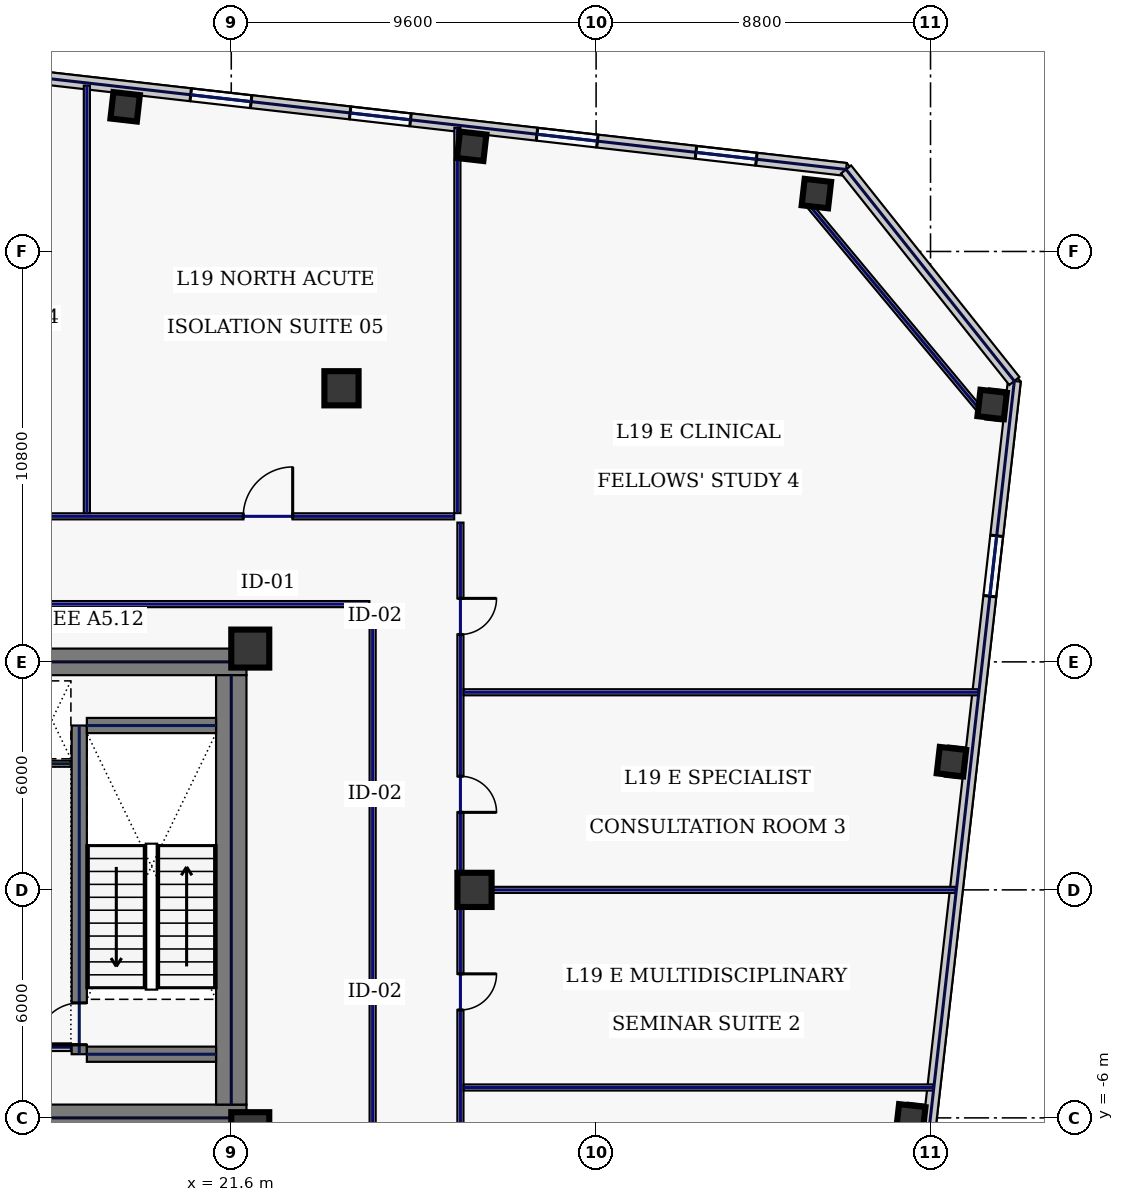
"""IFC4 building model, lengths in metres.
Left out: names, types, materials, properties, quantities, classifications, styles, units other than length and angle.
Written with IfcOpenShell. Run it as: python <this file> out.ifc"""

import sys

from ifc_helpers import new_model, si_unit, direction, frame, frame_2d, origin, origin_2d, place, context, subcontext, project, spatial, rectangle, hollow_rectangle, extrude, element, fill, save


model = new_model("IFC4")
c1 = context("Model", 3, precision=1e-05, world=origin(), true_north=direction((0.0, 1.0)))
c2 = subcontext(c1, "Body", "Model", "MODEL_VIEW")
j1 = project(units=[si_unit("LENGTHUNIT", "METRE"), si_unit("PLANEANGLEUNIT", "RADIAN")], contexts=[c1])
p1 = place(None, origin())
s1 = spatial("IfcSite", under=j1, at=p1, CompositionType="ELEMENT")
p2 = place(p1, origin())
s2 = spatial("IfcBuilding", under=s1, at=p2, CompositionType="ELEMENT")
p3 = place(p2, frame((0.0, 0.0, 89.4)))
s3 = spatial("IfcBuildingStorey", under=s2, at=p3, CompositionType="ELEMENT", Elevation=89.4)
for number, where, z_axis, x_axis in (
    (1, (10.45, 6.0, 0.0), (0.0, 0.0, 1.0), (1.0, 0.0, 0.0)),
    (2, (10.45, -6.0, 0.0), (0.0, 0.0, 1.0), (1.0, 0.0, 0.0)),
):
    element("IfcWall", number, at=place(p3, frame(where, z_axis=z_axis, x_axis=x_axis)), inside=s3, PredefinedType="SHEAR", context=c2, shape_type="SweptSolid", body=[
        extrude(rectangle(XDim=11.55, YDim=0.7, at=frame_2d((5.775, 0.0))), origin(), (0.0, 0.0, 1.0), 3.74),
    ])
p4 = place(p3, frame((21.6, -5.65, 0.0), z_axis=(0.0, 0.0, 1.0), x_axis=(0.0, 1.0, 0.0)))
e3 = element("IfcWall", 3, at=p4, inside=s3, PredefinedType="SHEAR", context=c2, shape_type="SweptSolid", body=[
    extrude(rectangle(XDim=11.3, YDim=0.8, at=frame_2d((5.65, 0.0))), origin(), (0.0, 0.0, 1.0), 3.74),
])
p5 = place(p3, frame((17.6, -4.325, 0.0), z_axis=(0.0, 0.0, 1.0), x_axis=(0.0, 1.0, 0.0)))
e4 = element("IfcWall", 4, at=p5, inside=s3, PredefinedType="SHEAR", context=c2, shape_type="SweptSolid", body=[
    extrude(rectangle(XDim=8.65, YDim=0.4, at=frame_2d((4.325, 0.0))), origin(), (0.0, 0.0, 1.0), 3.74),
])
p6 = place(p5, frame((0.25, 0.0, 0.0)))
e5 = element("IfcOpeningElement", 5, at=p6, cuts=e4, PredefinedType="OPENING", context=c2, shape_type="SweptSolid", body=[
    extrude(rectangle(XDim=1.1, YDim=2.2, at=frame_2d((0.55, 1.1))), frame((0.0, 0.21, 0.0), z_axis=(0.0, -1.0, 0.0), x_axis=(1.0, 0.0, 0.0)), (0.0, 0.0, 1.0), 0.42),
])
for number, where, z_axis, x_axis in (
    (6, (17.8, -4.325, 0.0), (0.0, 0.0, 1.0), (1.0, 0.0, 0.0)),
    (7, (17.8, 4.325, 0.0), (0.0, 0.0, 1.0), (1.0, 0.0, 0.0)),
):
    element("IfcWall", number, at=place(p3, frame(where, z_axis=z_axis, x_axis=x_axis)), inside=s3, PredefinedType="SHEAR", context=c2, shape_type="SweptSolid", body=[
        extrude(rectangle(XDim=3.4, YDim=0.4, at=frame_2d((1.7, 0.0))), origin(), (0.0, 0.0, 1.0), 3.74),
    ])
for number, where, z_axis, x_axis in (
    (8, (22.1, -6.35, 0.0), (0.0, 0.0, 1.0), (1.0, 0.0, 0.0)),
    (9, (22.1, 6.35, 0.0), (0.0, 0.0, 1.0), (1.0, 0.0, 0.0)),
):
    element("IfcColumn", number, at=place(p3, frame(where, z_axis=z_axis, x_axis=x_axis)), inside=s3, PredefinedType="COLUMN", context=c2, shape_type="SweptSolid", body=[
        extrude(hollow_rectangle(XDim=1.0, YDim=1.0, WallThickness=0.045, at=origin_2d()), origin(), (0.0, 0.0, 1.0), 3.74),
    ])
for number, where, z_axis, x_axis in (
    (10, (24.5, 13.2, 0.0), (0.0, 0.0, 1.0), (1.0, 0.0, 0.0)),
    (11, (28.0, 0.0, 0.0), (0.0, 0.0, 1.0), (1.0, 0.0, 0.0)),
):
    element("IfcColumn", number, at=place(p3, frame(where, z_axis=z_axis, x_axis=x_axis)), inside=s3, PredefinedType="COLUMN", context=c2, shape_type="SweptSolid", body=[
        extrude(hollow_rectangle(XDim=0.9, YDim=0.9, WallThickness=0.04, at=origin_2d()), origin(), (0.0, 0.0, 1.0), 3.74),
    ])
for number, where, z_axis, x_axis in (
    (12, (36.997, 18.323, 0.0), (0.0, 0.0, 1.0), (0.994, -0.113, 0.0)),
    (13, (27.926, 19.568, 0.0), (0.0, 0.0, 1.0), (0.994, -0.113, 0.0)),
    (14, (18.808, 20.607, 0.0), (0.0, 0.0, 1.0), (0.994, -0.113, 0.0)),
    (15, (39.48, -6.025, 0.0), (0.0, 0.0, 1.0), (0.994, -0.113, 0.0)),
    (16, (40.551, 3.375, 0.0), (0.0, 0.0, 1.0), (0.994, -0.113, 0.0)),
    (17, (41.622, 12.774, 0.0), (0.0, 0.0, 1.0), (0.994, -0.113, 0.0)),
):
    element("IfcColumn", number, at=place(p3, frame(where, z_axis=z_axis, x_axis=x_axis)), inside=s3, PredefinedType="COLUMN", context=c2, shape_type="SweptSolid", body=[
        extrude(hollow_rectangle(XDim=0.7, YDim=0.7, WallThickness=0.032, at=origin_2d()), origin(), (0.0, 0.0, 1.0), 3.74),
    ])
p7 = place(p3, frame((37.777, 18.958, 0.0), z_axis=(0.0, 0.0, 1.0), x_axis=(-0.993571362037, 0.113207546299, 0.0)))
e18 = element("IfcWall", 18, at=p7, inside=s3, PredefinedType="STANDARD", context=c2, shape_type="SweptSolid", body=[
    extrude(rectangle(XDim=21.223, YDim=0.34, at=frame_2d((10.611, 0.0))), origin(), (0.0, 0.0, 1.0), 3.74),
])
p8 = place(p7, frame((15.756, 0.0, 0.22)))
e19 = element("IfcOpeningElement", 19, at=p8, cuts=e18, PredefinedType="OPENING", context=c2, shape_type="SweptSolid", body=[
    extrude(rectangle(XDim=1.6, YDim=1.2, at=frame_2d((0.8, 0.6))), frame((0.0, 0.18, 0.0), z_axis=(0.0, -1.0, 0.0), x_axis=(1.0, 0.0, 0.0)), (0.0, 0.0, 1.0), 0.36),
])
p9 = place(p7, frame((11.535, 0.0, 0.22)))
e20 = element("IfcOpeningElement", 20, at=p9, cuts=e18, PredefinedType="OPENING", context=c2, shape_type="SweptSolid", body=[
    extrude(rectangle(XDim=1.6, YDim=1.2, at=frame_2d((0.8, 0.6))), frame((0.0, 0.18, 0.0), z_axis=(0.0, -1.0, 0.0), x_axis=(1.0, 0.0, 0.0)), (0.0, 0.0, 1.0), 0.36),
])
p10 = place(p7, frame((6.586, 0.0, 0.22)))
e21 = element("IfcOpeningElement", 21, at=p10, cuts=e18, PredefinedType="OPENING", context=c2, shape_type="SweptSolid", body=[
    extrude(rectangle(XDim=1.6, YDim=1.2, at=frame_2d((0.8, 0.6))), frame((0.0, 0.18, 0.0), z_axis=(0.0, -1.0, 0.0), x_axis=(1.0, 0.0, 0.0)), (0.0, 0.0, 1.0), 0.36),
])
p11 = place(p7, frame((2.375, 0.0, 0.22)))
e22 = element("IfcOpeningElement", 22, at=p11, cuts=e18, PredefinedType="OPENING", context=c2, shape_type="SweptSolid", body=[
    extrude(rectangle(XDim=1.6, YDim=1.2, at=frame_2d((0.8, 0.6))), frame((0.0, 0.18, 0.0), z_axis=(0.0, -1.0, 0.0), x_axis=(1.0, 0.0, 0.0)), (0.0, 0.0, 1.0), 0.36),
])
p12 = place(p3, frame((37.768, -25.556, 0.0), z_axis=(0.0, 0.0, 1.0), x_axis=(0.113201605824, 0.993572038877, 0.0)))
e23 = element("IfcWall", 23, at=p12, inside=s3, PredefinedType="STANDARD", context=c2, shape_type="SweptSolid", body=[
    extrude(rectangle(XDim=39.2, YDim=0.34, at=frame_2d((19.6, 0.0))), origin(), (0.0, 0.0, 1.0), 3.74),
])
p13 = place(p12, frame((4.1, 0.0, 0.22)))
e24 = element("IfcOpeningElement", 24, at=p13, cuts=e23, PredefinedType="OPENING", context=c2, shape_type="SweptSolid", body=[
    extrude(rectangle(XDim=1.6, YDim=1.2, at=frame_2d((0.8, 0.6))), frame((0.0, 0.18, 0.0), z_axis=(0.0, -1.0, 0.0), x_axis=(1.0, 0.0, 0.0)), (0.0, 0.0, 1.0), 0.36),
])
p14 = place(p12, frame((13.9, 0.0, 0.22)))
e25 = element("IfcOpeningElement", 25, at=p14, cuts=e23, PredefinedType="OPENING", context=c2, shape_type="SweptSolid", body=[
    extrude(rectangle(XDim=1.6, YDim=1.2, at=frame_2d((0.8, 0.6))), frame((0.0, 0.18, 0.0), z_axis=(0.0, -1.0, 0.0), x_axis=(1.0, 0.0, 0.0)), (0.0, 0.0, 1.0), 0.36),
])
p15 = place(p12, frame((33.5, 0.0, 0.22)))
e26 = element("IfcOpeningElement", 26, at=p15, cuts=e23, PredefinedType="OPENING", context=c2, shape_type="SweptSolid", body=[
    extrude(rectangle(XDim=1.6, YDim=1.2, at=frame_2d((0.8, 0.6))), frame((0.0, 0.18, 0.0), z_axis=(0.0, -1.0, 0.0), x_axis=(1.0, 0.0, 0.0)), (0.0, 0.0, 1.0), 0.36),
])
p16 = place(p3, frame((42.206, 13.392, 0.0), z_axis=(0.0, 0.0, 1.0), x_axis=(-0.622524521309, 0.782600294128, 0.0)))
e27 = element("IfcWall", 27, at=p16, inside=s3, PredefinedType="STANDARD", context=c2, shape_type="SweptSolid", body=[
    extrude(rectangle(XDim=7.113, YDim=0.34, at=frame_2d((3.557, 0.0))), origin(), (0.0, 0.0, 1.0), 3.74),
])
p17 = place(p3, frame((15.725, 3.32, 0.0), z_axis=(0.0, 0.0, 1.0), x_axis=(1.0, 0.0, 0.0)))
e28 = element("IfcWall", 28, at=p17, inside=s3, PredefinedType="PARTITIONING", context=c2, shape_type="SweptSolid", body=[
    extrude(rectangle(XDim=1.655, YDim=0.16, at=frame_2d((0.827, 0.0))), origin(), (0.0, 0.0, 1.0), 3.74),
])
p18 = place(p3, frame((14.72, -4.14, 0.0), z_axis=(0.0, 0.0, 1.0), x_axis=(1.0, 0.0, 0.0)))
e29 = element("IfcWall", 29, at=p18, inside=s3, PredefinedType="SOLIDWALL", context=c2, shape_type="SweptSolid", body=[
    extrude(rectangle(XDim=2.66, YDim=0.2, at=frame_2d((1.33, 0.0))), origin(), (0.0, 0.0, 1.0), 3.74),
])
p19 = place(p18, frame((0.88, 0.0, 0.0)))
e30 = element("IfcOpeningElement", 30, at=p19, cuts=e29, PredefinedType="OPENING", context=c2, shape_type="SweptSolid", body=[
    extrude(rectangle(XDim=0.95, YDim=2.2, at=frame_2d((0.475, 1.1))), frame((0.0, 0.11, 0.0), z_axis=(0.0, -1.0, 0.0), x_axis=(1.0, 0.0, 0.0)), (0.0, 0.0, 1.0), 0.22),
])
p20 = place(p3, frame((41.361, 12.556, 0.0), z_axis=(0.0, 0.0, 1.0), x_axis=(-0.640217638562, 0.768193579298, 0.0)))
e31 = element("IfcWall", 31, at=p20, inside=s3, PredefinedType="PARTITIONING", context=c2, shape_type="SweptSolid", body=[
    extrude(rectangle(XDim=7.224, YDim=0.16, at=frame_2d((3.612, 0.0))), origin(), (0.0, 0.0, 1.0), 1.535),
])
p21 = place(p3, frame((-27.465, 9.83, 0.0), z_axis=(0.0, 0.0, 1.0), x_axis=(1.0, 0.0, 0.0)))
e32 = element("IfcWall", 32, at=p21, inside=s3, PredefinedType="PARTITIONING", context=c2, shape_type="SweptSolid", body=[
    extrude(rectangle(XDim=54.93, YDim=0.16, at=frame_2d((27.465, 0.0))), origin(), (0.0, 0.0, 1.0), 3.74),
])
p22 = place(p21, frame((4.294, 0.0, 0.0)))
e33 = element("IfcOpeningElement", 33, at=p22, cuts=e32, PredefinedType="OPENING", context=c2, shape_type="SweptSolid", body=[
    extrude(rectangle(XDim=0.95, YDim=2.2, at=frame_2d((0.475, 1.1))), frame((0.0, 0.09, 0.0), z_axis=(0.0, -1.0, 0.0), x_axis=(1.0, 0.0, 0.0)), (0.0, 0.0, 1.0), 0.18),
])
p23 = place(p21, frame((13.84, 0.0, 0.0)))
e34 = element("IfcOpeningElement", 34, at=p23, cuts=e32, PredefinedType="OPENING", context=c2, shape_type="SweptSolid", body=[
    extrude(rectangle(XDim=1.3, YDim=2.2, at=frame_2d((0.65, 1.1))), frame((0.0, 0.09, 0.0), z_axis=(0.0, -1.0, 0.0), x_axis=(1.0, 0.0, 0.0)), (0.0, 0.0, 1.0), 0.18),
])
p24 = place(p21, frame((23.995, 0.0, 0.0)))
e35 = element("IfcOpeningElement", 35, at=p24, cuts=e32, PredefinedType="OPENING", context=c2, shape_type="SweptSolid", body=[
    extrude(rectangle(XDim=0.95, YDim=2.2, at=frame_2d((0.475, 1.1))), frame((0.0, 0.09, 0.0), z_axis=(0.0, -1.0, 0.0), x_axis=(1.0, 0.0, 0.0)), (0.0, 0.0, 1.0), 0.18),
])
p25 = place(p21, frame((32.335, 0.0, 0.0)))
e36 = element("IfcOpeningElement", 36, at=p25, cuts=e32, PredefinedType="OPENING", context=c2, shape_type="SweptSolid", body=[
    extrude(rectangle(XDim=1.05, YDim=2.2, at=frame_2d((0.525, 1.1))), frame((0.0, 0.09, 0.0), z_axis=(0.0, -1.0, 0.0), x_axis=(1.0, 0.0, 0.0)), (0.0, 0.0, 1.0), 0.18),
])
p26 = place(p21, frame((40.455, 0.0, 0.0)))
e37 = element("IfcOpeningElement", 37, at=p26, cuts=e32, PredefinedType="OPENING", context=c2, shape_type="SweptSolid", body=[
    extrude(rectangle(XDim=0.95, YDim=2.2, at=frame_2d((0.475, 1.1))), frame((0.0, 0.09, 0.0), z_axis=(0.0, -1.0, 0.0), x_axis=(1.0, 0.0, 0.0)), (0.0, 0.0, 1.0), 0.18),
])
p27 = place(p21, frame((49.381, 0.0, 0.0)))
e38 = element("IfcOpeningElement", 38, at=p27, cuts=e32, PredefinedType="OPENING", context=c2, shape_type="SweptSolid", body=[
    extrude(rectangle(XDim=1.3, YDim=2.2, at=frame_2d((0.65, 1.1))), frame((0.0, 0.09, 0.0), z_axis=(0.0, -1.0, 0.0), x_axis=(1.0, 0.0, 0.0)), (0.0, 0.0, 1.0), 0.18),
])
p28 = place(p3, frame((27.63, 9.665, 0.0), z_axis=(0.0, 0.0, 1.0), x_axis=(0.0, -1.0, 0.0)))
e39 = element("IfcWall", 39, at=p28, inside=s3, PredefinedType="PARTITIONING", context=c2, shape_type="SweptSolid", body=[
    extrude(rectangle(XDim=19.28, YDim=0.16, at=frame_2d((9.64, 0.0))), origin(), (0.0, 0.0, 1.0), 3.74),
])
p29 = place(p28, frame((16.531, 0.0, 0.0)))
e40 = element("IfcOpeningElement", 40, at=p29, cuts=e39, PredefinedType="OPENING", context=c2, shape_type="SweptSolid", body=[
    extrude(rectangle(XDim=0.95, YDim=2.2, at=frame_2d((0.475, 1.1))), frame((0.0, 0.09, 0.0), z_axis=(0.0, -1.0, 0.0), x_axis=(1.0, 0.0, 0.0)), (0.0, 0.0, 1.0), 0.18),
])
p30 = place(p28, frame((11.875, 0.0, 0.0)))
e41 = element("IfcOpeningElement", 41, at=p30, cuts=e39, PredefinedType="OPENING", context=c2, shape_type="SweptSolid", body=[
    extrude(rectangle(XDim=0.95, YDim=2.2, at=frame_2d((0.475, 1.1))), frame((0.0, 0.09, 0.0), z_axis=(0.0, -1.0, 0.0), x_axis=(1.0, 0.0, 0.0)), (0.0, 0.0, 1.0), 0.18),
])
p31 = place(p28, frame((6.675, 0.0, 0.0)))
e42 = element("IfcOpeningElement", 42, at=p31, cuts=e39, PredefinedType="OPENING", context=c2, shape_type="SweptSolid", body=[
    extrude(rectangle(XDim=0.95, YDim=2.2, at=frame_2d((0.475, 1.1))), frame((0.0, 0.09, 0.0), z_axis=(0.0, -1.0, 0.0), x_axis=(1.0, 0.0, 0.0)), (0.0, 0.0, 1.0), 0.18),
])
p32 = place(p28, frame((1.994, 0.0, 0.0)))
e43 = element("IfcOpeningElement", 43, at=p32, cuts=e39, PredefinedType="OPENING", context=c2, shape_type="SweptSolid", body=[
    extrude(rectangle(XDim=0.95, YDim=2.2, at=frame_2d((0.475, 1.1))), frame((0.0, 0.09, 0.0), z_axis=(0.0, -1.0, 0.0), x_axis=(1.0, 0.0, 0.0)), (0.0, 0.0, 1.0), 0.18),
])
p33 = place(p3, frame((25.235, 7.52, 0.0), z_axis=(0.0, 0.0, 1.0), x_axis=(-1.0, 0.0, 0.0)))
e44 = element("IfcWall", 44, at=p33, inside=s3, PredefinedType="PARTITIONING", context=c2, shape_type="SweptSolid", body=[
    extrude(rectangle(XDim=14.57, YDim=0.16, at=frame_2d((7.285, 0.0))), origin(), (0.0, 0.0, 1.0), 3.74),
])
p34 = place(p3, frame((25.32, -7.385, 0.0), z_axis=(0.0, 0.0, 1.0), x_axis=(0.0, 1.0, 0.0)))
e45 = element("IfcWall", 45, at=p34, inside=s3, PredefinedType="PARTITIONING", context=c2, shape_type="SweptSolid", body=[
    extrude(rectangle(XDim=14.82, YDim=0.16, at=frame_2d((7.41, 0.0))), origin(), (0.0, 0.0, 1.0), 3.74),
])
p35 = place(p3, frame((27.55, 9.915, 0.0), z_axis=(0.0, 0.0, 1.0), x_axis=(0.0, 1.0, 0.0)))
e46 = element("IfcWall", 46, at=p35, inside=s3, PredefinedType="PARTITIONING", context=c2, shape_type="SweptSolid", body=[
    extrude(rectangle(XDim=10.138, YDim=0.16, at=frame_2d((5.069, 0.0))), origin(), (0.0, 0.0, 1.0), 3.74),
])
p36 = place(p3, frame((17.8, 9.915, 0.0), z_axis=(0.0, 0.0, 1.0), x_axis=(0.0, 1.0, 0.0)))
e47 = element("IfcWall", 47, at=p36, inside=s3, PredefinedType="PARTITIONING", context=c2, shape_type="SweptSolid", body=[
    extrude(rectangle(XDim=11.249, YDim=0.16, at=frame_2d((5.625, 0.0))), origin(), (0.0, 0.0, 1.0), 3.74),
])
p37 = place(p3, frame((27.715, -5.2, 0.0), z_axis=(0.0, 0.0, 1.0), x_axis=(1.0, 0.0, 0.0)))
e48 = element("IfcWall", 48, at=p37, inside=s3, PredefinedType="PARTITIONING", context=c2, shape_type="SweptSolid", body=[
    extrude(rectangle(XDim=12.352, YDim=0.16, at=frame_2d((6.176, 0.0))), origin(), (0.0, 0.0, 1.0), 3.74),
])
p38 = place(p3, frame((27.715, 0.0, 0.0), z_axis=(0.0, 0.0, 1.0), x_axis=(1.0, 0.0, 0.0)))
e49 = element("IfcWall", 49, at=p38, inside=s3, PredefinedType="PARTITIONING", context=c2, shape_type="SweptSolid", body=[
    extrude(rectangle(XDim=12.945, YDim=0.16, at=frame_2d((6.472, 0.0))), origin(), (0.0, 0.0, 1.0), 2.135),
])
p39 = place(p3, frame((27.715, 5.2, 0.0), z_axis=(0.0, 0.0, 1.0), x_axis=(1.0, 0.0, 0.0)))
e50 = element("IfcWall", 50, at=p39, inside=s3, PredefinedType="PARTITIONING", context=c2, shape_type="SweptSolid", body=[
    extrude(rectangle(XDim=13.537, YDim=0.16, at=frame_2d((6.769, 0.0))), origin(), (0.0, 0.0, 1.0), 3.74),
])
p40 = place(p8, origin())
e51 = element("IfcWindow", 51, at=p40, inside=s3, PartitioningType="SINGLE_PANEL", PredefinedType="WINDOW", context=c2, shape_type="SweptSolid", body=[
    extrude(rectangle(XDim=1.6, YDim=1.2, at=frame_2d((0.8, 0.6))), frame((0.0, 0.03, 0.0), z_axis=(0.0, -1.0, 0.0), x_axis=(1.0, 0.0, 0.0)), (0.0, 0.0, 1.0), 0.06),
])
fill(e19, e51)
p41 = place(p9, origin())
e52 = element("IfcWindow", 52, at=p41, inside=s3, PartitioningType="SINGLE_PANEL", PredefinedType="WINDOW", context=c2, shape_type="SweptSolid", body=[
    extrude(rectangle(XDim=1.6, YDim=1.2, at=frame_2d((0.8, 0.6))), frame((0.0, 0.03, 0.0), z_axis=(0.0, -1.0, 0.0), x_axis=(1.0, 0.0, 0.0)), (0.0, 0.0, 1.0), 0.06),
])
fill(e20, e52)
p42 = place(p10, origin())
e53 = element("IfcWindow", 53, at=p42, inside=s3, PartitioningType="SINGLE_PANEL", PredefinedType="WINDOW", context=c2, shape_type="SweptSolid", body=[
    extrude(rectangle(XDim=1.6, YDim=1.2, at=frame_2d((0.8, 0.6))), frame((0.0, 0.03, 0.0), z_axis=(0.0, -1.0, 0.0), x_axis=(1.0, 0.0, 0.0)), (0.0, 0.0, 1.0), 0.06),
])
fill(e21, e53)
p43 = place(p11, origin())
e54 = element("IfcWindow", 54, at=p43, inside=s3, PartitioningType="SINGLE_PANEL", PredefinedType="WINDOW", context=c2, shape_type="SweptSolid", body=[
    extrude(rectangle(XDim=1.6, YDim=1.2, at=frame_2d((0.8, 0.6))), frame((0.0, 0.03, 0.0), z_axis=(0.0, -1.0, 0.0), x_axis=(1.0, 0.0, 0.0)), (0.0, 0.0, 1.0), 0.06),
])
fill(e22, e54)
p44 = place(p15, origin())
e55 = element("IfcWindow", 55, at=p44, inside=s3, PartitioningType="SINGLE_PANEL", PredefinedType="WINDOW", context=c2, shape_type="SweptSolid", body=[
    extrude(rectangle(XDim=1.6, YDim=1.2, at=frame_2d((0.8, 0.6))), frame((0.0, 0.03, 0.0), z_axis=(0.0, -1.0, 0.0), x_axis=(1.0, 0.0, 0.0)), (0.0, 0.0, 1.0), 0.06),
])
fill(e26, e55)
p45 = place(p6, origin())
e56 = element("IfcDoor", 56, at=p45, inside=s3, OperationType="SINGLE_SWING_LEFT", PredefinedType="DOOR", context=c2, shape_type="SweptSolid", body=[
    extrude(rectangle(XDim=1.1, YDim=2.2, at=frame_2d((0.55, 1.1))), frame((0.0, 0.025, 0.0), z_axis=(0.0, -1.0, 0.0), x_axis=(1.0, 0.0, 0.0)), (0.0, 0.0, 1.0), 0.05),
])
fill(e5, e56)
p46 = place(p27, origin())
e57 = element("IfcDoor", 57, at=p46, inside=s3, OperationType="SINGLE_SWING_RIGHT", PredefinedType="DOOR", context=c2, shape_type="SweptSolid", body=[
    extrude(rectangle(XDim=1.3, YDim=2.2, at=frame_2d((0.65, 1.1))), frame((0.0, 0.025, 0.0), z_axis=(0.0, -1.0, 0.0), x_axis=(1.0, 0.0, 0.0)), (0.0, 0.0, 1.0), 0.05),
])
fill(e38, e57)
p47 = place(p30, origin())
e58 = element("IfcDoor", 58, at=p47, inside=s3, OperationType="SINGLE_SWING_LEFT", PredefinedType="DOOR", context=c2, shape_type="SweptSolid", body=[
    extrude(rectangle(XDim=0.95, YDim=2.2, at=frame_2d((0.475, 1.1))), frame((0.0, 0.025, 0.0), z_axis=(0.0, -1.0, 0.0), x_axis=(1.0, 0.0, 0.0)), (0.0, 0.0, 1.0), 0.05),
])
fill(e41, e58)
p48 = place(p31, origin())
e59 = element("IfcDoor", 59, at=p48, inside=s3, OperationType="SINGLE_SWING_RIGHT", PredefinedType="DOOR", context=c2, shape_type="SweptSolid", body=[
    extrude(rectangle(XDim=0.95, YDim=2.2, at=frame_2d((0.475, 1.1))), frame((0.0, 0.025, 0.0), z_axis=(0.0, -1.0, 0.0), x_axis=(1.0, 0.0, 0.0)), (0.0, 0.0, 1.0), 0.05),
])
fill(e42, e59)
p49 = place(p32, origin())
e60 = element("IfcDoor", 60, at=p49, inside=s3, OperationType="SINGLE_SWING_LEFT", PredefinedType="DOOR", context=c2, shape_type="SweptSolid", body=[
    extrude(rectangle(XDim=0.95, YDim=2.2, at=frame_2d((0.475, 1.1))), frame((0.0, 0.025, 0.0), z_axis=(0.0, -1.0, 0.0), x_axis=(1.0, 0.0, 0.0)), (0.0, 0.0, 1.0), 0.05),
])
fill(e43, e60)
save(model, sys.argv[1])
